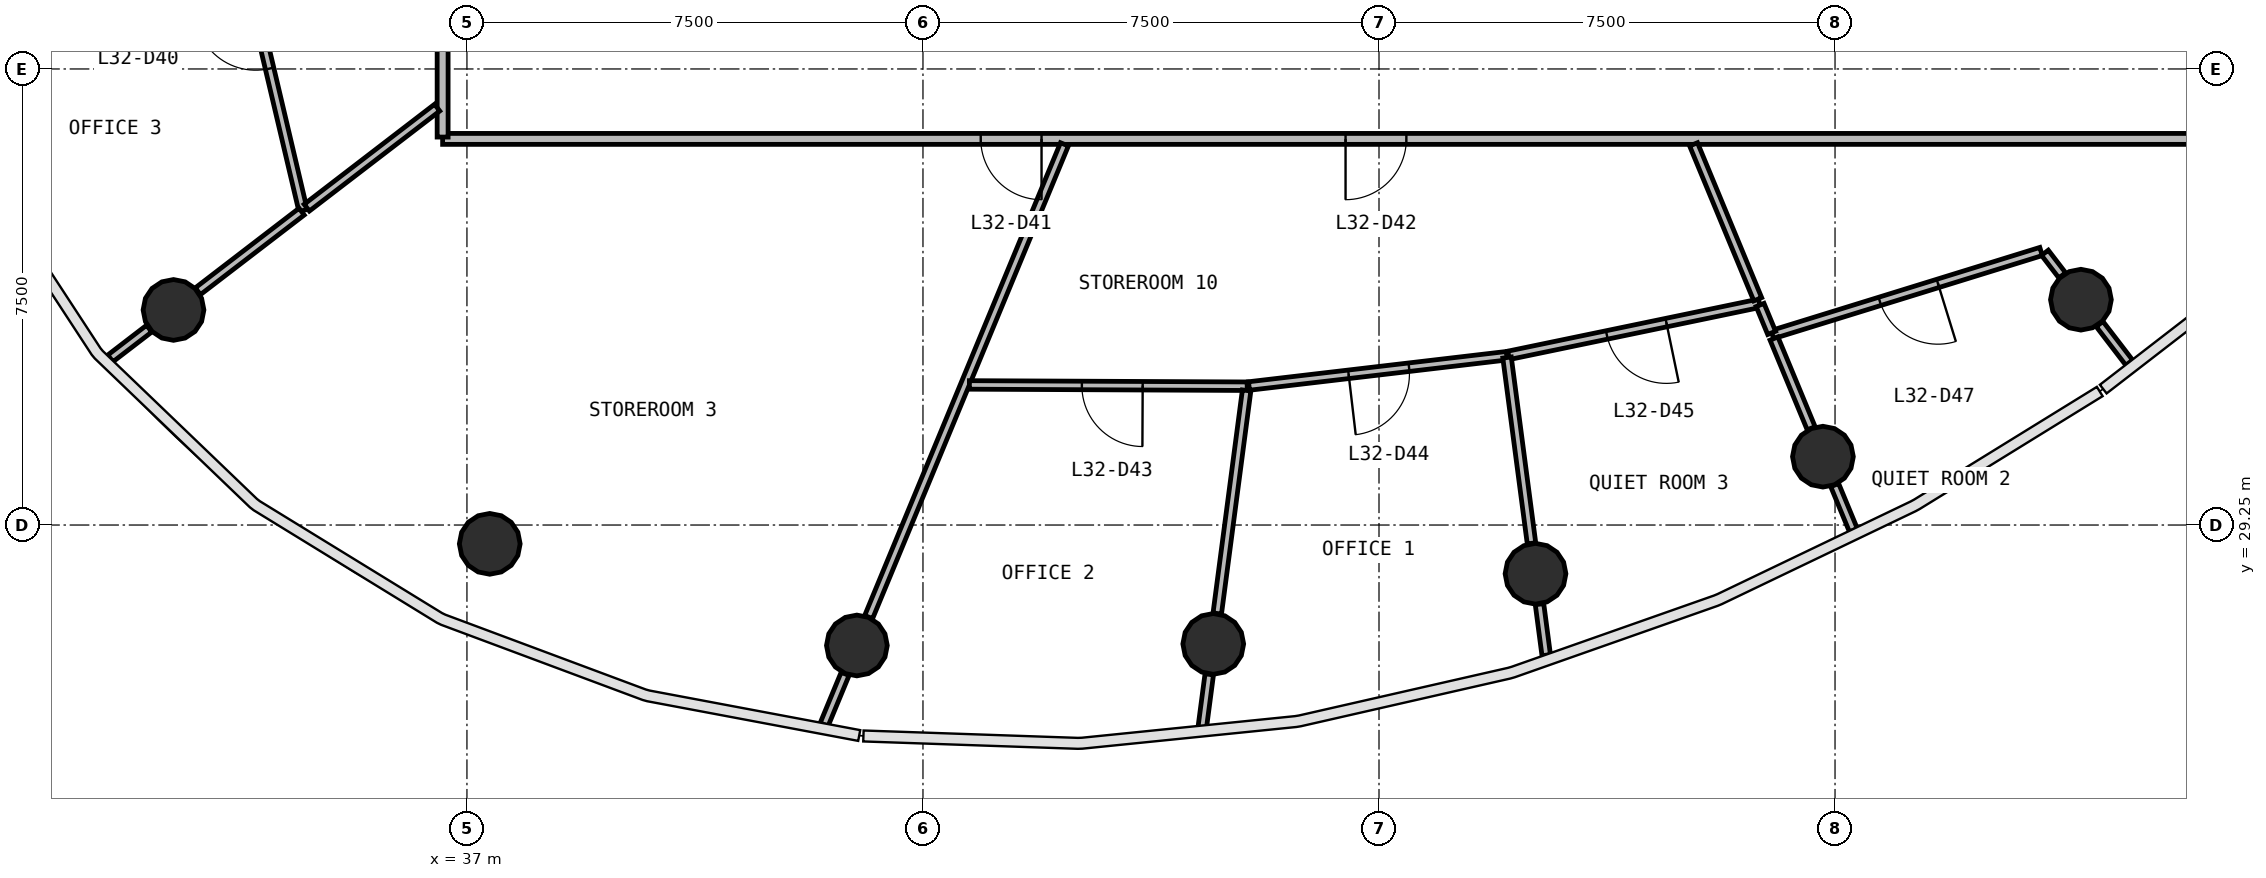
"""IFC4 building model, lengths in metres.
Left out: names, types, materials, properties, quantities, classifications, styles, units other than length and angle.
Written with IfcOpenShell. Run it as: python <this file> out.ifc"""

import sys

from ifc_helpers import new_model, si_unit, direction, frame, frame_2d, origin, origin_2d, place, context, subcontext, project, spatial, rectangle, circle, extrude, source, transform, mapped, element, fill, save


model = new_model("IFC4")
c1 = context("Model", 3, precision=1e-05, world=origin(), true_north=direction((0.0, 1.0)))
c2 = subcontext(c1, "Body", "Model", "MODEL_VIEW")
j1 = project(units=[si_unit("LENGTHUNIT", "METRE"), si_unit("PLANEANGLEUNIT", "RADIAN")], contexts=[c1])
p1 = place(None, origin())
s1 = spatial("IfcSite", under=j1, at=p1, CompositionType="ELEMENT")
p2 = place(p1, origin())
s2 = spatial("IfcBuilding", under=s1, at=p2, CompositionType="ELEMENT")
p3 = place(p2, frame((0.0, 0.0, 137.0)))
s3 = spatial("IfcBuildingStorey", under=s2, at=p3, CompositionType="ELEMENT", Elevation=137.0)
m1 = source(origin(), c2, "Body", "SweptSolid", [
    extrude(circle(Radius=0.5, at=origin_2d()), origin(), (0.0, 0.0, 1.0), 3.9),
])
for number, where, z_axis, x_axis in (
    (1, (32.174, 32.787, 0.0), (0.0, 0.0, 1.0), (1.0, 0.0, 0.0)),
    (2, (37.375, 28.94, 0.0), (0.0, 0.0, 1.0), (1.0, 0.0, 0.0)),
    (3, (43.413, 27.269, 0.0), (0.0, 0.0, 1.0), (1.0, 0.0, 0.0)),
    (4, (49.274, 27.295, 0.0), (0.0, 0.0, 1.0), (1.0, 0.0, 0.0)),
    (5, (54.574, 28.449, 0.0), (0.0, 0.0, 1.0), (1.0, 0.0, 0.0)),
    (6, (59.301, 30.374, 0.0), (0.0, 0.0, 1.0), (1.0, 0.0, 0.0)),
    (7, (63.544, 32.956, 0.0), (0.0, 0.0, 1.0), (1.0, 0.0, 0.0)),
):
    element("IfcColumn", number, at=place(p3, frame(where, z_axis=z_axis, x_axis=x_axis)), inside=s3, PredefinedType="COLUMN", context=c2, shape_type="MappedRepresentation", body=[
        mapped(m1, transform((0.0, 0.0, 0.0), scale=1.0)),
    ])
p4 = place(p3, frame((67.4, 35.6, 0.0), z_axis=(0.0, 0.0, 1.0), x_axis=(-1.0, 0.0, 0.0)))
e8 = element("IfcWall", 8, at=p4, inside=s3, PredefinedType="PARTITIONING", context=c2, shape_type="SweptSolid", body=[
    extrude(rectangle(XDim=30.8, YDim=0.18, at=frame_2d((15.4, 0.0))), origin(), (0.0, 0.0, 1.0), 2.88),
])
p5 = place(p4, frame((20.95, 0.0, 0.0)))
e9 = element("IfcOpeningElement", 9, at=p5, cuts=e8, PredefinedType="OPENING", context=c2, shape_type="SweptSolid", body=[
    extrude(rectangle(XDim=1.0, YDim=2.1, at=frame_2d((0.5, 1.05))), frame((0.0, 0.1, 0.0), z_axis=(0.0, -1.0, 0.0), x_axis=(1.0, 0.0, 0.0)), (0.0, 0.0, 1.0), 0.2),
])
p6 = place(p4, frame((14.95, 0.0, 0.0)))
e10 = element("IfcOpeningElement", 10, at=p6, cuts=e8, PredefinedType="OPENING", context=c2, shape_type="SweptSolid", body=[
    extrude(rectangle(XDim=1.0, YDim=2.1, at=frame_2d((0.5, 1.05))), frame((0.0, 0.1, 0.0), z_axis=(0.0, -1.0, 0.0), x_axis=(1.0, 0.0, 0.0)), (0.0, 0.0, 1.0), 0.2),
])
p7 = place(p3, frame((36.6, 35.63, 0.0), z_axis=(0.0, 0.0, 1.0), x_axis=(0.0, 1.0, 0.0)))
e11 = element("IfcWall", 11, at=p7, inside=s3, PredefinedType="PARTITIONING", context=c2, shape_type="SweptSolid", body=[
    extrude(rectangle(XDim=23.638, YDim=0.18, at=frame_2d((11.819, 0.0))), origin(), (0.0, 0.0, 1.0), 2.88),
])
p8 = place(p7, frame((14.587, 0.0, 0.0)))
e12 = element("IfcOpeningElement", 12, at=p8, cuts=e11, PredefinedType="OPENING", context=c2, shape_type="SweptSolid", body=[
    extrude(rectangle(XDim=1.0, YDim=2.1, at=frame_2d((0.5, 1.05))), frame((0.0, 0.1, 0.0), z_axis=(0.0, -1.0, 0.0), x_axis=(1.0, 0.0, 0.0)), (0.0, 0.0, 1.0), 0.2),
])
p9 = place(p7, frame((11.387, 0.0, 0.0)))
e13 = element("IfcOpeningElement", 13, at=p9, cuts=e11, PredefinedType="OPENING", context=c2, shape_type="SweptSolid", body=[
    extrude(rectangle(XDim=1.0, YDim=2.1, at=frame_2d((0.5, 1.05))), frame((0.0, 0.1, 0.0), z_axis=(0.0, -1.0, 0.0), x_axis=(1.0, 0.0, 0.0)), (0.0, 0.0, 1.0), 0.2),
])
p10 = place(p7, frame((8.988, 0.0, 0.0)))
e14 = element("IfcOpeningElement", 14, at=p10, cuts=e11, PredefinedType="OPENING", context=c2, shape_type="SweptSolid", body=[
    extrude(rectangle(XDim=1.0, YDim=2.1, at=frame_2d((0.5, 1.05))), frame((0.0, 0.1, 0.0), z_axis=(0.0, -1.0, 0.0), x_axis=(1.0, 0.0, 0.0)), (0.0, 0.0, 1.0), 0.2),
])
p11 = place(p3, frame((43.606, 27.736, 0.0), z_axis=(0.0, 0.0, 1.0), x_axis=(0.382678066506, 0.923881755104, 0.0)))
e15 = element("IfcWall", 15, at=p11, inside=s3, PredefinedType="PARTITIONING", context=c2, shape_type="SweptSolid", body=[
    extrude(rectangle(XDim=8.415, YDim=0.14, at=frame_2d((4.208, 0.0))), origin(), (0.0, 0.0, 1.0), 2.88),
])
p12 = place(p3, frame((34.305, 34.422, 0.0), z_axis=(0.0, 0.0, 1.0), x_axis=(-0.229548849755, 0.973297141461, 0.0)))
e16 = element("IfcWall", 16, at=p12, inside=s3, PredefinedType="PARTITIONING", context=c2, shape_type="SweptSolid", body=[
    extrude(rectangle(XDim=5.849, YDim=0.14, at=frame_2d((2.924, 0.0))), origin(), (0.0, 0.0, 1.0), 2.88),
])
p13 = place(p12, frame((2.398, 0.0, 0.0)))
e17 = element("IfcOpeningElement", 17, at=p13, cuts=e16, PredefinedType="OPENING", context=c2, shape_type="SweptSolid", body=[
    extrude(rectangle(XDim=1.0, YDim=2.1, at=frame_2d((0.5, 1.05))), frame((0.0, 0.08, 0.0), z_axis=(0.0, -1.0, 0.0), x_axis=(1.0, 0.0, 0.0)), (0.0, 0.0, 1.0), 0.16),
])
p14 = place(p3, frame((49.832, 31.533, 0.0), z_axis=(0.0, 0.0, 1.0), x_axis=(-0.999989439774, 0.004595687053, 0.0)))
e18 = element("IfcWall", 18, at=p14, inside=s3, PredefinedType="PARTITIONING", context=c2, shape_type="SweptSolid", body=[
    extrude(rectangle(XDim=4.569, YDim=0.14, at=frame_2d((2.284, 0.0))), origin(), (0.0, 0.0, 1.0), 2.88),
])
p15 = place(p14, frame((1.719, 0.0, 0.0)))
e19 = element("IfcOpeningElement", 19, at=p15, cuts=e18, PredefinedType="OPENING", context=c2, shape_type="SweptSolid", body=[
    extrude(rectangle(XDim=1.0, YDim=2.1, at=frame_2d((0.5, 1.05))), frame((0.0, 0.08, 0.0), z_axis=(0.0, -1.0, 0.0), x_axis=(1.0, 0.0, 0.0)), (0.0, 0.0, 1.0), 0.16),
])
p16 = place(p3, frame((62.888, 33.748, 0.0), z_axis=(0.0, 0.0, 1.0), x_axis=(-0.955370687091, -0.295409631272, 0.0)))
e20 = element("IfcWall", 20, at=p16, inside=s3, PredefinedType="PARTITIONING", context=c2, shape_type="SweptSolid", body=[
    extrude(rectangle(XDim=4.626, YDim=0.14, at=frame_2d((2.313, 0.0))), origin(), (0.0, 0.0, 1.0), 2.88),
])
p17 = place(p16, frame((1.776, 0.0, 0.0)))
e21 = element("IfcOpeningElement", 21, at=p17, cuts=e20, PredefinedType="OPENING", context=c2, shape_type="SweptSolid", body=[
    extrude(rectangle(XDim=1.0, YDim=2.1, at=frame_2d((0.5, 1.05))), frame((0.0, 0.08, 0.0), z_axis=(0.0, -1.0, 0.0), x_axis=(1.0, 0.0, 0.0)), (0.0, 0.0, 1.0), 0.16),
])
p18 = place(p3, frame((54.102, 32.034, 0.0), z_axis=(0.0, 0.0, 1.0), x_axis=(-0.993178291909, -0.116605662302, 0.0)))
e22 = element("IfcWall", 22, at=p18, inside=s3, PredefinedType="PARTITIONING", context=c2, shape_type="SweptSolid", body=[
    extrude(rectangle(XDim=4.269, YDim=0.14, at=frame_2d((2.135, 0.0))), origin(), (0.0, 0.0, 1.0), 2.88),
])
p19 = place(p18, frame((1.619, 0.0, 0.0)))
e23 = element("IfcOpeningElement", 23, at=p19, cuts=e22, PredefinedType="OPENING", context=c2, shape_type="SweptSolid", body=[
    extrude(rectangle(XDim=1.0, YDim=2.1, at=frame_2d((0.5, 1.05))), frame((0.0, 0.08, 0.0), z_axis=(0.0, -1.0, 0.0), x_axis=(1.0, 0.0, 0.0)), (0.0, 0.0, 1.0), 0.16),
])
p20 = place(p3, frame((58.256, 32.897, 0.0), z_axis=(0.0, 0.0, 1.0), x_axis=(-0.979114250406, -0.203310808004, 0.0)))
e24 = element("IfcWall", 24, at=p20, inside=s3, PredefinedType="PARTITIONING", context=c2, shape_type="SweptSolid", body=[
    extrude(rectangle(XDim=4.212, YDim=0.14, at=frame_2d((2.106, 0.0))), origin(), (0.0, 0.0, 1.0), 2.88),
])
p21 = place(p20, frame((1.562, 0.0, 0.0)))
e25 = element("IfcOpeningElement", 25, at=p21, cuts=e24, PredefinedType="OPENING", context=c2, shape_type="SweptSolid", body=[
    extrude(rectangle(XDim=1.0, YDim=2.1, at=frame_2d((0.5, 1.05))), frame((0.0, 0.08, 0.0), z_axis=(0.0, -1.0, 0.0), x_axis=(1.0, 0.0, 0.0)), (0.0, 0.0, 1.0), 0.16),
])
p22 = place(p3, frame((49.823, 31.463, 0.0), z_axis=(0.0, 0.0, 1.0), x_axis=(-0.130529622112, -0.991444409814, 0.0)))
e26 = element("IfcWall", 26, at=p22, inside=s3, PredefinedType="PARTITIONING", context=c2, shape_type="SweptSolid", body=[
    extrude(rectangle(XDim=3.7, YDim=0.14, at=frame_2d((1.85, 0.0))), origin(), (0.0, 0.0, 1.0), 2.88),
])
p23 = place(p3, frame((58.267, 32.869, 0.0), z_axis=(0.0, 0.0, 1.0), x_axis=(0.382871995511, -0.923801404553, 0.0)))
e27 = element("IfcWall", 27, at=p23, inside=s3, PredefinedType="PARTITIONING", context=c2, shape_type="SweptSolid", body=[
    extrude(rectangle(XDim=0.497, YDim=0.14, at=frame_2d((0.249, 0.0))), origin(), (0.0, 0.0, 1.0), 2.88),
])
p24 = place(p3, frame((57.174, 35.51, 0.0), z_axis=(0.0, 0.0, 1.0), x_axis=(0.382690664401, -0.923876536871, 0.0)))
e28 = element("IfcWall", 28, at=p24, inside=s3, PredefinedType="PARTITIONING", context=c2, shape_type="SweptSolid", body=[
    extrude(rectangle(XDim=2.757, YDim=0.14, at=frame_2d((1.379, 0.0))), origin(), (0.0, 0.0, 1.0), 2.88),
])
p25 = place(p3, frame((54.106, 32.004, 0.0), z_axis=(0.0, 0.0, 1.0), x_axis=(0.130466807305, -0.991452677737, 0.0)))
e29 = element("IfcWall", 29, at=p25, inside=s3, PredefinedType="PARTITIONING", context=c2, shape_type="SweptSolid", body=[
    extrude(rectangle(XDim=3.082, YDim=0.14, at=frame_2d((1.541, 0.0))), origin(), (0.0, 0.0, 1.0), 2.88),
])
p26 = place(p3, frame((36.51, 36.114, 0.0), z_axis=(0.0, 0.0, 1.0), x_axis=(-0.793382381067, -0.608723580463, 0.0)))
e30 = element("IfcWall", 30, at=p26, inside=s3, PredefinedType="PARTITIONING", context=c2, shape_type="SweptSolid", body=[
    extrude(rectangle(XDim=2.702, YDim=0.14, at=frame_2d((1.351, 0.0))), origin(), (0.0, 0.0, 1.0), 2.88),
])
p27 = place(p3, frame((58.496, 32.317, 0.0), z_axis=(0.0, 0.0, 1.0), x_axis=(0.382770137499, -0.923843613302, 0.0)))
e31 = element("IfcWall", 31, at=p27, inside=s3, PredefinedType="PARTITIONING", context=c2, shape_type="SweptSolid", body=[
    extrude(rectangle(XDim=1.598, YDim=0.14, at=frame_2d((0.799, 0.0))), origin(), (0.0, 0.0, 1.0), 2.88),
])
p28 = place(p3, frame((34.281, 34.404, 0.0), z_axis=(0.0, 0.0, 1.0), x_axis=(-0.793416377259, -0.608679268824, 0.0)))
e32 = element("IfcWall", 32, at=p28, inside=s3, PredefinedType="PARTITIONING", context=c2, shape_type="SweptSolid", body=[
    extrude(rectangle(XDim=2.152, YDim=0.14, at=frame_2d((1.076, 0.0))), origin(), (0.0, 0.0, 1.0), 2.88),
])
p29 = place(p3, frame((43.22, 26.802, 0.0), z_axis=(0.0, 0.0, 1.0), x_axis=(-0.382812744071, -0.923825959246, 0.0)))
e33 = element("IfcWall", 33, at=p29, inside=s3, PredefinedType="PARTITIONING", context=c2, shape_type="SweptSolid", body=[
    extrude(rectangle(XDim=0.904, YDim=0.14, at=frame_2d((0.452, 0.0))), origin(), (0.0, 0.0, 1.0), 2.88),
])
p30 = place(p3, frame((49.208, 26.795, 0.0), z_axis=(0.0, 0.0, 1.0), x_axis=(-0.130575653556, -0.99143834841, 0.0)))
e34 = element("IfcWall", 34, at=p30, inside=s3, PredefinedType="PARTITIONING", context=c2, shape_type="SweptSolid", body=[
    extrude(rectangle(XDim=0.886, YDim=0.14, at=frame_2d((0.443, 0.0))), origin(), (0.0, 0.0, 1.0), 2.88),
])
p31 = place(p3, frame((54.64, 27.948, 0.0), z_axis=(0.0, 0.0, 1.0), x_axis=(0.130499323257, -0.99144839837, 0.0)))
e35 = element("IfcWall", 35, at=p31, inside=s3, PredefinedType="PARTITIONING", context=c2, shape_type="SweptSolid", body=[
    extrude(rectangle(XDim=0.846, YDim=0.14, at=frame_2d((0.423, 0.0))), origin(), (0.0, 0.0, 1.0), 2.88),
])
p32 = place(p3, frame((59.494, 29.908, 0.0), z_axis=(0.0, 0.0, 1.0), x_axis=(0.382655293316, -0.923891187585, 0.0)))
e36 = element("IfcWall", 36, at=p32, inside=s3, PredefinedType="PARTITIONING", context=c2, shape_type="SweptSolid", body=[
    extrude(rectangle(XDim=0.805, YDim=0.14, at=frame_2d((0.403, 0.0))), origin(), (0.0, 0.0, 1.0), 2.88),
])
p33 = place(p3, frame((31.774, 32.48, 0.0), z_axis=(0.0, 0.0, 1.0), x_axis=(-0.79332296125, -0.6088010177, 0.0)))
e37 = element("IfcWall", 37, at=p33, inside=s3, PredefinedType="PARTITIONING", context=c2, shape_type="SweptSolid", body=[
    extrude(rectangle(XDim=0.804, YDim=0.14, at=frame_2d((0.402, 0.0))), origin(), (0.0, 0.0, 1.0), 2.88),
])
p34 = place(p3, frame((63.851, 32.555, 0.0), z_axis=(0.0, 0.0, 1.0), x_axis=(0.60864917868, -0.793439460383, 0.0)))
e38 = element("IfcWall", 38, at=p34, inside=s3, PredefinedType="PARTITIONING", context=c2, shape_type="SweptSolid", body=[
    extrude(rectangle(XDim=0.801, YDim=0.14, at=frame_2d((0.4, 0.0))), origin(), (0.0, 0.0, 1.0), 2.88),
])
p35 = place(p3, frame((62.952, 33.727, 0.0), z_axis=(0.0, 0.0, 1.0), x_axis=(0.608727169633, -0.79337962726, 0.0)))
e39 = element("IfcWall", 39, at=p35, inside=s3, PredefinedType="PARTITIONING", context=c2, shape_type="SweptSolid", body=[
    extrude(rectangle(XDim=0.468, YDim=0.14, at=frame_2d((0.234, 0.0))), origin(), (0.0, 0.0, 1.0), 2.88),
])
m2 = source(origin(), c2, "Body", "SweptSolid", [
    extrude(rectangle(XDim=1.0, YDim=2.1, at=frame_2d((0.5, 1.05))), frame((0.0, 0.025, 0.0), z_axis=(0.0, -1.0, 0.0), x_axis=(1.0, 0.0, 0.0)), (0.0, 0.0, 1.0), 0.05),
])
p36 = place(p13, origin())
e40 = element("IfcDoor", 40, at=p36, inside=s3, OperationType="SINGLE_SWING_RIGHT", PredefinedType="DOOR", context=c2, shape_type="MappedRepresentation", body=[
    mapped(m2, transform((0.0, 0.0, 0.0), scale=1.0)),
])
fill(e17, e40)
p37 = place(p5, origin())
e41 = element("IfcDoor", 41, at=p37, inside=s3, OperationType="SINGLE_SWING_LEFT", PredefinedType="DOOR", context=c2, shape_type="MappedRepresentation", body=[
    mapped(m2, transform((0.0, 0.0, 0.0), scale=1.0)),
])
fill(e9, e41)
p38 = place(p6, origin())
e42 = element("IfcDoor", 42, at=p38, inside=s3, OperationType="SINGLE_SWING_RIGHT", PredefinedType="DOOR", context=c2, shape_type="MappedRepresentation", body=[
    mapped(m2, transform((0.0, 0.0, 0.0), scale=1.0)),
])
fill(e10, e42)
p39 = place(p15, origin())
e43 = element("IfcDoor", 43, at=p39, inside=s3, OperationType="SINGLE_SWING_LEFT", PredefinedType="DOOR", context=c2, shape_type="MappedRepresentation", body=[
    mapped(m2, transform((0.0, 0.0, 0.0), scale=1.0)),
])
fill(e19, e43)
p40 = place(p19, origin())
e44 = element("IfcDoor", 44, at=p40, inside=s3, OperationType="SINGLE_SWING_RIGHT", PredefinedType="DOOR", context=c2, shape_type="MappedRepresentation", body=[
    mapped(m2, transform((0.0, 0.0, 0.0), scale=1.0)),
])
fill(e23, e44)
p41 = place(p21, origin())
e45 = element("IfcDoor", 45, at=p41, inside=s3, OperationType="SINGLE_SWING_LEFT", PredefinedType="DOOR", context=c2, shape_type="MappedRepresentation", body=[
    mapped(m2, transform((0.0, 0.0, 0.0), scale=1.0)),
])
fill(e25, e45)
p42 = place(p17, origin())
e46 = element("IfcDoor", 46, at=p42, inside=s3, OperationType="SINGLE_SWING_LEFT", PredefinedType="DOOR", context=c2, shape_type="MappedRepresentation", body=[
    mapped(m2, transform((0.0, 0.0, 0.0), scale=1.0)),
])
fill(e21, e46)
save(model, sys.argv[1])
